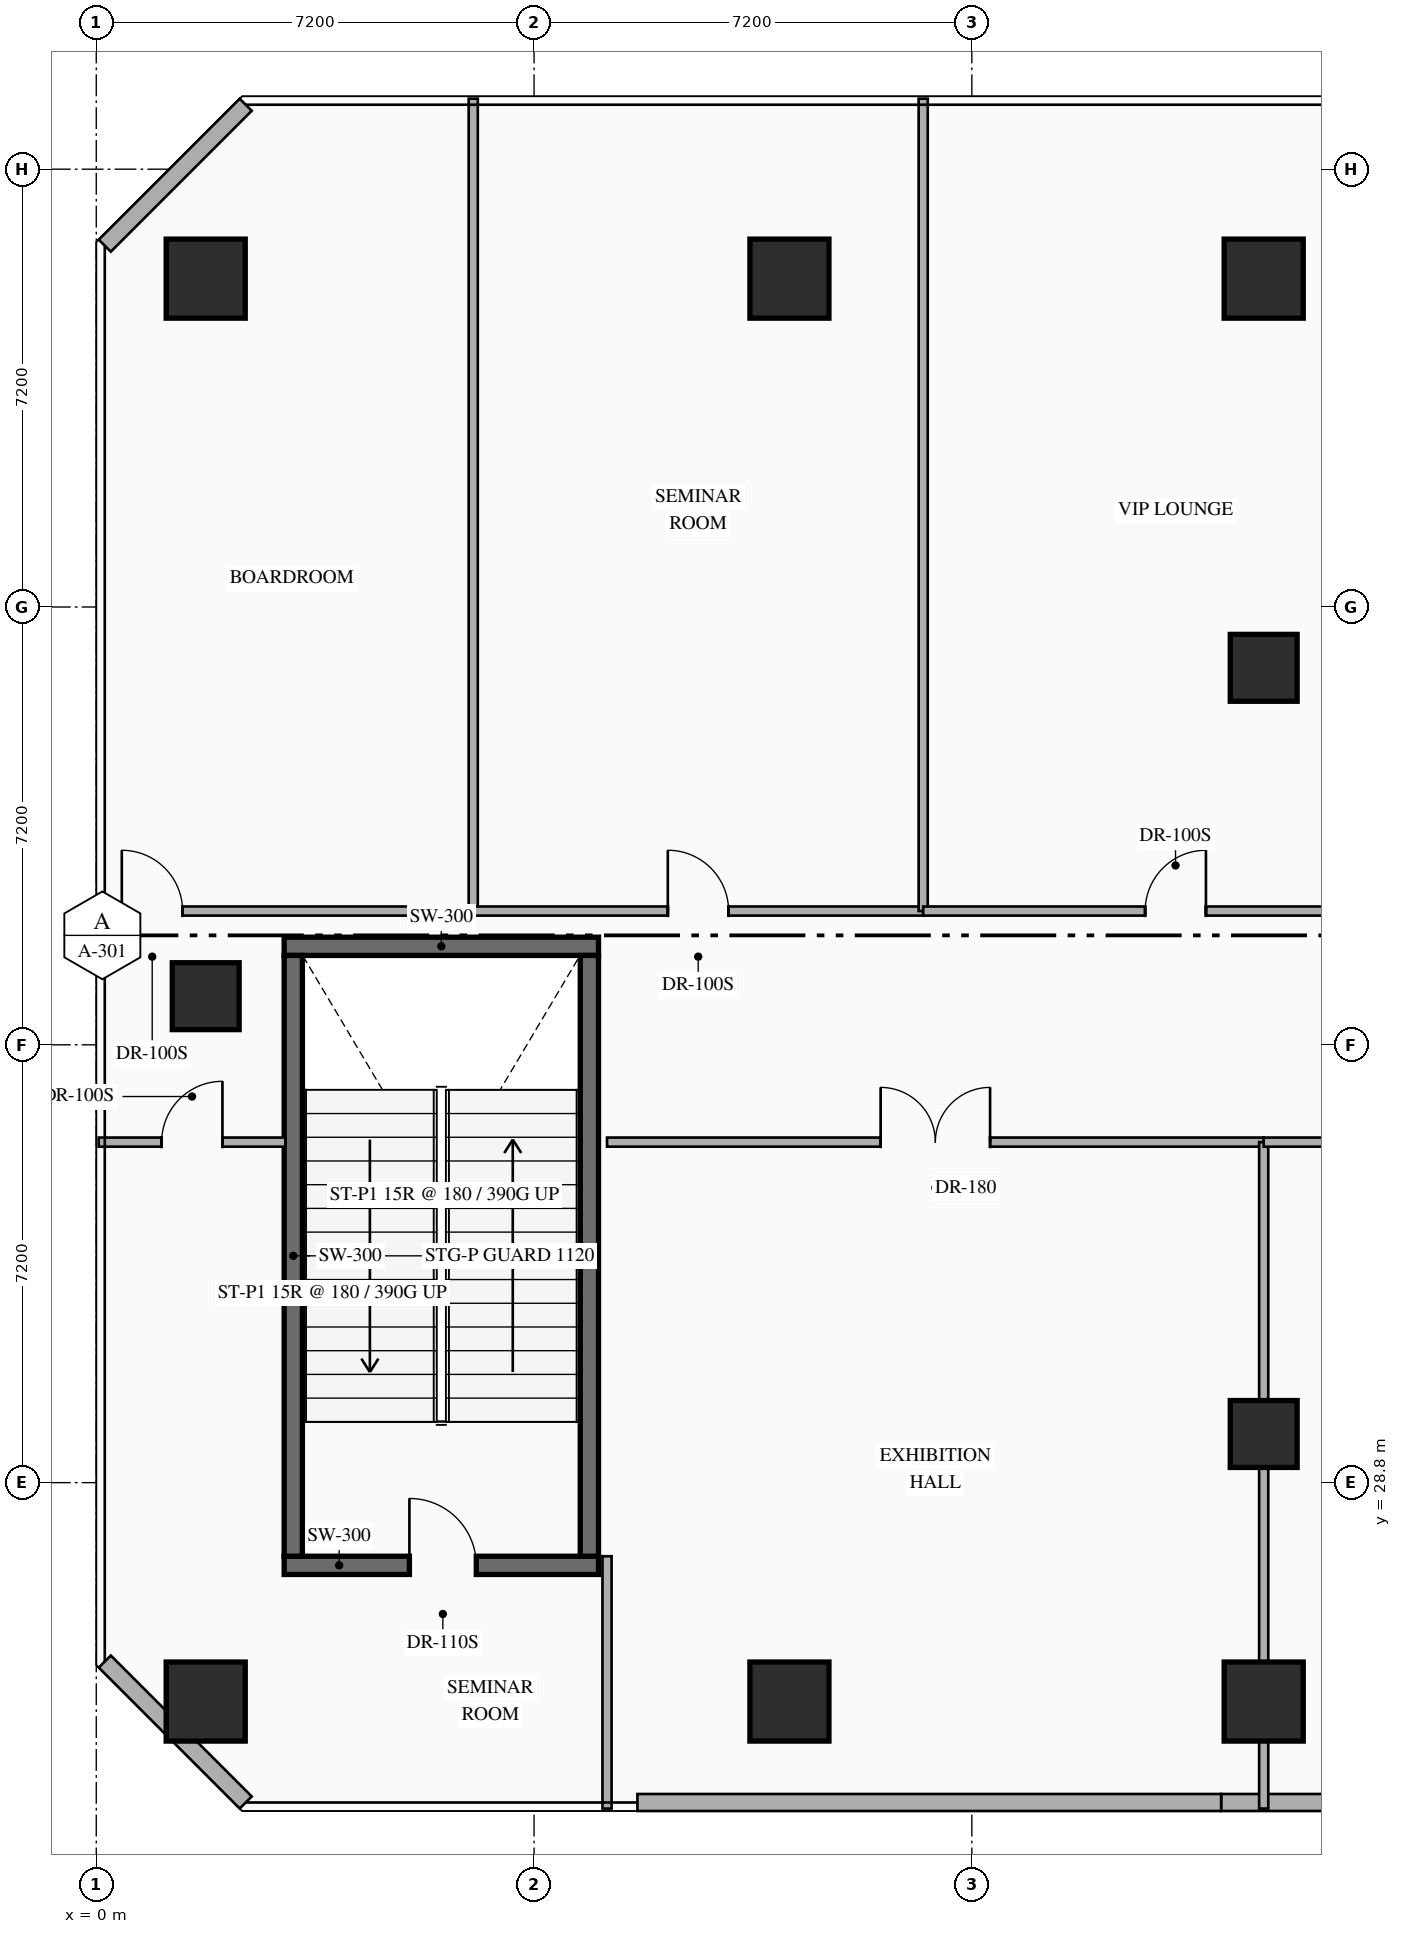
"""IFC4 building model, lengths in metres.
Left out: names, types, materials, properties, quantities, classifications, styles, units other than length and angle.
Written with IfcOpenShell. Run it as: python <this file> out.ifc"""

import sys

from ifc_helpers import new_model, si_unit, direction, frame, frame_2d, origin, origin_2d, place, context, subcontext, project, spatial, rectangle, hollow_rectangle, extrude, element, fill, save


model = new_model("IFC4")
c1 = context("Model", 3, precision=1e-05, world=origin(), true_north=direction((0.0, 1.0)))
c2 = subcontext(c1, "Body", "Model", "MODEL_VIEW")
j1 = project(units=[si_unit("LENGTHUNIT", "METRE"), si_unit("PLANEANGLEUNIT", "RADIAN")], contexts=[c1])
p1 = place(None, origin())
s1 = spatial("IfcSite", under=j1, at=p1, CompositionType="ELEMENT")
p2 = place(p1, origin())
s2 = spatial("IfcBuilding", under=s1, at=p2, CompositionType="ELEMENT")
p3 = place(p2, frame((0.0, 0.0, 10.8)))
s3 = spatial("IfcBuildingStorey", under=s2, at=p3, CompositionType="ELEMENT", Elevation=10.8)
p4 = place(p3, frame((3.09, 27.44, 0.0), z_axis=(0.0, 0.0, 1.0), x_axis=(1.0, 0.0, 0.0)))
e1 = element("IfcWall", 1, at=p4, inside=s3, PredefinedType="SHEAR", context=c2, shape_type="SweptSolid", body=[
    extrude(rectangle(XDim=5.17, YDim=0.3, at=frame_2d((2.585, 0.0))), origin(), (0.0, 0.0, 1.0), 5.4),
])
p5 = place(p4, frame((2.06, 0.0, 0.0)))
e2 = element("IfcOpeningElement", 2, at=p5, cuts=e1, PredefinedType="OPENING", context=c2, shape_type="SweptSolid", body=[
    extrude(rectangle(XDim=1.1, YDim=2.2, at=frame_2d((0.55, 1.1))), frame((0.0, 0.16, 0.0), z_axis=(0.0, -1.0, 0.0), x_axis=(1.0, 0.0, 0.0)), (0.0, 0.0, 1.0), 0.32),
])
p6 = place(p3, frame((3.09, 37.62, 0.0), z_axis=(0.0, 0.0, 1.0), x_axis=(1.0, 0.0, 0.0)))
e3 = element("IfcWall", 3, at=p6, inside=s3, PredefinedType="SHEAR", context=c2, shape_type="SweptSolid", body=[
    extrude(rectangle(XDim=5.17, YDim=0.3, at=frame_2d((2.585, 0.0))), origin(), (0.0, 0.0, 1.0), 5.4),
])
for number, where, z_axis, x_axis in (
    (4, (3.24, 27.59, 0.0), (0.0, 0.0, 1.0), (0.0, 1.0, 0.0)),
    (5, (8.11, 27.59, 0.0), (0.0, 0.0, 1.0), (0.0, 1.0, 0.0)),
):
    element("IfcWall", number, at=place(p3, frame(where, z_axis=z_axis, x_axis=x_axis)), inside=s3, PredefinedType="SHEAR", context=c2, shape_type="SweptSolid", body=[
        extrude(rectangle(XDim=9.88, YDim=0.3, at=frame_2d((4.94, 0.0))), origin(), (0.0, 0.0, 1.0), 5.4),
    ])
for number, where, z_axis, x_axis in (
    (6, (1.8, 25.2, 0.0), (0.0, 0.0, 1.0), (1.0, 0.0, 0.0)),
    (7, (1.8, 48.6, 0.0), (0.0, 0.0, 1.0), (1.0, 0.0, 0.0)),
):
    element("IfcColumn", number, at=place(p3, frame(where, z_axis=z_axis, x_axis=x_axis)), inside=s3, PredefinedType="COLUMN", context=c2, shape_type="SweptSolid", body=[
        extrude(rectangle(XDim=1.3, YDim=1.3, at=origin_2d()), origin(), (0.0, 0.0, 1.0), 5.4),
    ])
p7 = place(p3, frame((1.8, 36.8, 0.0), z_axis=(0.0, 0.0, 1.0), x_axis=(1.0, 0.0, 0.0)))
e8 = element("IfcColumn", 8, at=p7, inside=s3, PredefinedType="COLUMN", context=c2, shape_type="SweptSolid", body=[
    extrude(hollow_rectangle(XDim=1.1, YDim=1.1, WallThickness=0.04, at=origin_2d()), origin(), (0.0, 0.0, 1.0), 5.4),
])
for number, where, z_axis, x_axis in (
    (9, (11.4, 25.2, 0.0), (0.0, 0.0, 1.0), (1.0, 0.0, 0.0)),
    (10, (11.4, 48.6, 0.0), (0.0, 0.0, 1.0), (1.0, 0.0, 0.0)),
    (11, (19.2, 48.6, 0.0), (0.0, 0.0, 1.0), (1.0, 0.0, 0.0)),
    (12, (19.2, 25.2, 0.0), (0.0, 0.0, 1.0), (1.0, 0.0, 0.0)),
):
    element("IfcColumn", number, at=place(p3, frame(where, z_axis=z_axis, x_axis=x_axis)), inside=s3, PredefinedType="COLUMN", context=c2, shape_type="SweptSolid", body=[
        extrude(rectangle(XDim=1.3, YDim=1.3, at=origin_2d()), origin(), (0.0, 0.0, 1.0), 5.4),
    ])
for number, where, z_axis, x_axis in (
    (13, (19.2, 29.6, 0.0), (0.0, 0.0, 1.0), (1.0, 0.0, 0.0)),
    (14, (19.2, 42.2, 0.0), (0.0, 0.0, 1.0), (1.0, 0.0, 0.0)),
):
    element("IfcColumn", number, at=place(p3, frame(where, z_axis=z_axis, x_axis=x_axis)), inside=s3, PredefinedType="COLUMN", context=c2, shape_type="SweptSolid", body=[
        extrude(hollow_rectangle(XDim=1.1, YDim=1.1, WallThickness=0.04, at=origin_2d()), origin(), (0.0, 0.0, 1.0), 5.4),
    ])
p8 = place(p3, frame((25.247, 23.54, 0.0), z_axis=(0.0, 0.0, 1.0), x_axis=(-1.0, 0.0, 0.0)))
e15 = element("IfcWall", 15, at=p8, inside=s3, PredefinedType="STANDARD", context=c2, shape_type="SweptSolid", body=[
    extrude(rectangle(XDim=6.747, YDim=0.28, at=frame_2d((3.374, 0.0))), origin(), (0.0, 0.0, 1.0), 5.1),
])
p9 = place(p3, frame((18.5, 23.54, 0.0), z_axis=(0.0, 0.0, 1.0), x_axis=(-1.0, 0.0, 0.0)))
e16 = element("IfcWall", 16, at=p9, inside=s3, PredefinedType="STANDARD", context=c2, shape_type="SweptSolid", body=[
    extrude(rectangle(XDim=9.6, YDim=0.28, at=frame_2d((4.8, 0.0))), origin(), (0.0, 0.0, 1.0), 5.1),
])
for number, where, z_axis, x_axis in (
    (17, (2.458, 23.54, 0.0), (0.0, 0.0, 1.0), (-0.707, 0.707, 0.0)),
    (18, (0.14, 49.142, 0.0), (0.0, 0.0, 1.0), (0.707, 0.707, 0.0)),
):
    element("IfcWall", number, at=place(p3, frame(where, z_axis=z_axis, x_axis=x_axis)), inside=s3, PredefinedType="STANDARD", context=c2, shape_type="SweptSolid", body=[
        extrude(rectangle(XDim=3.278, YDim=0.28, at=frame_2d((1.639, 0.0))), origin(), (0.0, 0.0, 1.0), 5.1),
    ])
p10 = place(p3, frame((0.04, 38.2, 0.0), z_axis=(0.0, 0.0, 1.0), x_axis=(1.0, 0.0, 0.0)))
e19 = element("IfcWall", 19, at=p10, inside=s3, PredefinedType="PARTITIONING", context=c2, shape_type="SweptSolid", body=[
    extrude(rectangle(XDim=6.16, YDim=0.15, at=frame_2d((3.08, 0.0))), origin(), (0.0, 0.0, 1.0), 5.1),
])
p11 = place(p10, frame((0.38, 0.0, 0.0)))
e20 = element("IfcOpeningElement", 20, at=p11, cuts=e19, PredefinedType="OPENING", context=c2, shape_type="SweptSolid", body=[
    extrude(rectangle(XDim=1.0, YDim=2.15, at=frame_2d((0.5, 1.075))), frame((0.0, 0.085, 0.0), z_axis=(0.0, -1.0, 0.0), x_axis=(1.0, 0.0, 0.0)), (0.0, 0.0, 1.0), 0.17),
])
p12 = place(p3, frame((6.2, 38.2, 0.0), z_axis=(0.0, 0.0, 1.0), x_axis=(0.0, 1.0, 0.0)))
e21 = element("IfcWall", 21, at=p12, inside=s3, PredefinedType="PARTITIONING", context=c2, shape_type="SweptSolid", body=[
    extrude(rectangle(XDim=13.36, YDim=0.15, at=frame_2d((6.68, 0.0))), origin(), (0.0, 0.0, 1.0), 5.1),
])
p13 = place(p3, frame((6.2, 38.2, 0.0), z_axis=(0.0, 0.0, 1.0), x_axis=(1.0, 0.0, 0.0)))
e22 = element("IfcWall", 22, at=p13, inside=s3, PredefinedType="PARTITIONING", context=c2, shape_type="SweptSolid", body=[
    extrude(rectangle(XDim=7.4, YDim=0.15, at=frame_2d((3.7, 0.0))), origin(), (0.0, 0.0, 1.0), 5.1),
])
p14 = place(p13, frame((3.2, 0.0, 0.0)))
e23 = element("IfcOpeningElement", 23, at=p14, cuts=e22, PredefinedType="OPENING", context=c2, shape_type="SweptSolid", body=[
    extrude(rectangle(XDim=1.0, YDim=2.15, at=frame_2d((0.5, 1.075))), frame((0.0, 0.085, 0.0), z_axis=(0.0, -1.0, 0.0), x_axis=(1.0, 0.0, 0.0)), (0.0, 0.0, 1.0), 0.17),
])
p15 = place(p3, frame((13.6, 38.2, 0.0), z_axis=(0.0, 0.0, 1.0), x_axis=(0.0, 1.0, 0.0)))
e24 = element("IfcWall", 24, at=p15, inside=s3, PredefinedType="PARTITIONING", context=c2, shape_type="SweptSolid", body=[
    extrude(rectangle(XDim=13.36, YDim=0.15, at=frame_2d((6.68, 0.0))), origin(), (0.0, 0.0, 1.0), 5.1),
])
p16 = place(p3, frame((13.6, 38.2, 0.0), z_axis=(0.0, 0.0, 1.0), x_axis=(1.0, 0.0, 0.0)))
e25 = element("IfcWall", 25, at=p16, inside=s3, PredefinedType="PARTITIONING", context=c2, shape_type="SweptSolid", body=[
    extrude(rectangle(XDim=8.3, YDim=0.15, at=frame_2d((4.15, 0.0))), origin(), (0.0, 0.0, 1.0), 5.1),
])
p17 = place(p16, frame((3.65, 0.0, 0.0)))
e26 = element("IfcOpeningElement", 26, at=p17, cuts=e25, PredefinedType="OPENING", context=c2, shape_type="SweptSolid", body=[
    extrude(rectangle(XDim=1.0, YDim=2.15, at=frame_2d((0.5, 1.075))), frame((0.0, 0.085, 0.0), z_axis=(0.0, -1.0, 0.0), x_axis=(1.0, 0.0, 0.0)), (0.0, 0.0, 1.0), 0.17),
])
p18 = place(p3, frame((0.04, 34.4, 0.0), z_axis=(0.0, 0.0, 1.0), x_axis=(1.0, 0.0, 0.0)))
e27 = element("IfcWall", 27, at=p18, inside=s3, PredefinedType="PARTITIONING", context=c2, shape_type="SweptSolid", body=[
    extrude(rectangle(XDim=3.07, YDim=0.15, at=frame_2d((1.535, 0.0))), origin(), (0.0, 0.0, 1.0), 5.1),
])
p19 = place(p18, frame((1.035, 0.0, 0.0)))
e28 = element("IfcOpeningElement", 28, at=p19, cuts=e27, PredefinedType="OPENING", context=c2, shape_type="SweptSolid", body=[
    extrude(rectangle(XDim=1.0, YDim=2.15, at=frame_2d((0.5, 1.075))), frame((0.0, 0.085, 0.0), z_axis=(0.0, -1.0, 0.0), x_axis=(1.0, 0.0, 0.0)), (0.0, 0.0, 1.0), 0.17),
])
p20 = place(p3, frame((8.4, 23.44, 0.0), z_axis=(0.0, 0.0, 1.0), x_axis=(0.0, 1.0, 0.0)))
e29 = element("IfcWall", 29, at=p20, inside=s3, PredefinedType="PARTITIONING", context=c2, shape_type="SweptSolid", body=[
    extrude(rectangle(XDim=4.15, YDim=0.15, at=frame_2d((2.075, 0.0))), origin(), (0.0, 0.0, 1.0), 5.1),
])
p21 = place(p3, frame((8.4, 34.4, 0.0), z_axis=(0.0, 0.0, 1.0), x_axis=(1.0, 0.0, 0.0)))
e30 = element("IfcWall", 30, at=p21, inside=s3, PredefinedType="PARTITIONING", context=c2, shape_type="SweptSolid", body=[
    extrude(rectangle(XDim=10.8, YDim=0.15, at=frame_2d((5.4, 0.0))), origin(), (0.0, 0.0, 1.0), 5.1),
])
p22 = place(p21, frame((4.5, 0.0, 0.0)))
e31 = element("IfcOpeningElement", 31, at=p22, cuts=e30, PredefinedType="OPENING", context=c2, shape_type="SweptSolid", body=[
    extrude(rectangle(XDim=1.8, YDim=2.35, at=frame_2d((0.9, 1.175))), frame((0.0, 0.085, 0.0), z_axis=(0.0, -1.0, 0.0), x_axis=(1.0, 0.0, 0.0)), (0.0, 0.0, 1.0), 0.17),
])
p23 = place(p3, frame((19.2, 23.44, 0.0), z_axis=(0.0, 0.0, 1.0), x_axis=(0.0, 1.0, 0.0)))
e32 = element("IfcWall", 32, at=p23, inside=s3, PredefinedType="PARTITIONING", context=c2, shape_type="SweptSolid", body=[
    extrude(rectangle(XDim=10.96, YDim=0.15, at=frame_2d((5.48, 0.0))), origin(), (0.0, 0.0, 1.0), 3.895),
])
p24 = place(p3, frame((19.2, 34.4, 0.0), z_axis=(0.0, 0.0, 1.0), x_axis=(1.0, 0.0, 0.0)))
e33 = element("IfcWall", 33, at=p24, inside=s3, PredefinedType="PARTITIONING", context=c2, shape_type="SweptSolid", body=[
    extrude(rectangle(XDim=4.3, YDim=0.15, at=frame_2d((2.15, 0.0))), origin(), (0.0, 0.0, 1.0), 5.1),
])
p25 = place(p24, frame((1.269, 0.0, 0.0)))
e34 = element("IfcOpeningElement", 34, at=p25, cuts=e33, PredefinedType="OPENING", context=c2, shape_type="SweptSolid", body=[
    extrude(rectangle(XDim=1.0, YDim=2.2, at=frame_2d((0.5, 1.1))), frame((0.0, 0.085, 0.0), z_axis=(0.0, -1.0, 0.0), x_axis=(1.0, 0.0, 0.0)), (0.0, 0.0, 1.0), 0.17),
])
p26 = place(p5, origin())
e35 = element("IfcDoor", 35, at=p26, inside=s3, OperationType="SINGLE_SWING_LEFT", PredefinedType="DOOR", context=c2, shape_type="SweptSolid", body=[
    extrude(rectangle(XDim=1.1, YDim=2.2, at=frame_2d((0.55, 1.1))), frame((0.0, 0.025, 0.0), z_axis=(0.0, -1.0, 0.0), x_axis=(1.0, 0.0, 0.0)), (0.0, 0.0, 1.0), 0.05),
])
fill(e2, e35)
p27 = place(p11, origin())
e36 = element("IfcDoor", 36, at=p27, inside=s3, OperationType="SINGLE_SWING_LEFT", PredefinedType="DOOR", context=c2, shape_type="SweptSolid", body=[
    extrude(rectangle(XDim=1.0, YDim=2.15, at=frame_2d((0.5, 1.075))), frame((0.0, 0.025, 0.0), z_axis=(0.0, -1.0, 0.0), x_axis=(1.0, 0.0, 0.0)), (0.0, 0.0, 1.0), 0.05),
])
fill(e20, e36)
p28 = place(p14, origin())
e37 = element("IfcDoor", 37, at=p28, inside=s3, OperationType="SINGLE_SWING_LEFT", PredefinedType="DOOR", context=c2, shape_type="SweptSolid", body=[
    extrude(rectangle(XDim=1.0, YDim=2.15, at=frame_2d((0.5, 1.075))), frame((0.0, 0.025, 0.0), z_axis=(0.0, -1.0, 0.0), x_axis=(1.0, 0.0, 0.0)), (0.0, 0.0, 1.0), 0.05),
])
fill(e23, e37)
p29 = place(p17, origin())
e38 = element("IfcDoor", 38, at=p29, inside=s3, OperationType="SINGLE_SWING_RIGHT", PredefinedType="DOOR", context=c2, shape_type="SweptSolid", body=[
    extrude(rectangle(XDim=1.0, YDim=2.15, at=frame_2d((0.5, 1.075))), frame((0.0, 0.025, 0.0), z_axis=(0.0, -1.0, 0.0), x_axis=(1.0, 0.0, 0.0)), (0.0, 0.0, 1.0), 0.05),
])
fill(e26, e38)
p30 = place(p19, origin())
e39 = element("IfcDoor", 39, at=p30, inside=s3, OperationType="SINGLE_SWING_RIGHT", PredefinedType="DOOR", context=c2, shape_type="SweptSolid", body=[
    extrude(rectangle(XDim=1.0, YDim=2.15, at=frame_2d((0.5, 1.075))), frame((0.0, 0.025, 0.0), z_axis=(0.0, -1.0, 0.0), x_axis=(1.0, 0.0, 0.0)), (0.0, 0.0, 1.0), 0.05),
])
fill(e28, e39)
p31 = place(p22, origin())
e40 = element("IfcDoor", 40, at=p31, inside=s3, OperationType="DOUBLE_DOOR_SINGLE_SWING", PredefinedType="DOOR", context=c2, shape_type="SweptSolid", body=[
    extrude(rectangle(XDim=1.8, YDim=2.35, at=frame_2d((0.9, 1.175))), frame((0.0, 0.025, 0.0), z_axis=(0.0, -1.0, 0.0), x_axis=(1.0, 0.0, 0.0)), (0.0, 0.0, 1.0), 0.05),
])
fill(e31, e40)
save(model, sys.argv[1])
